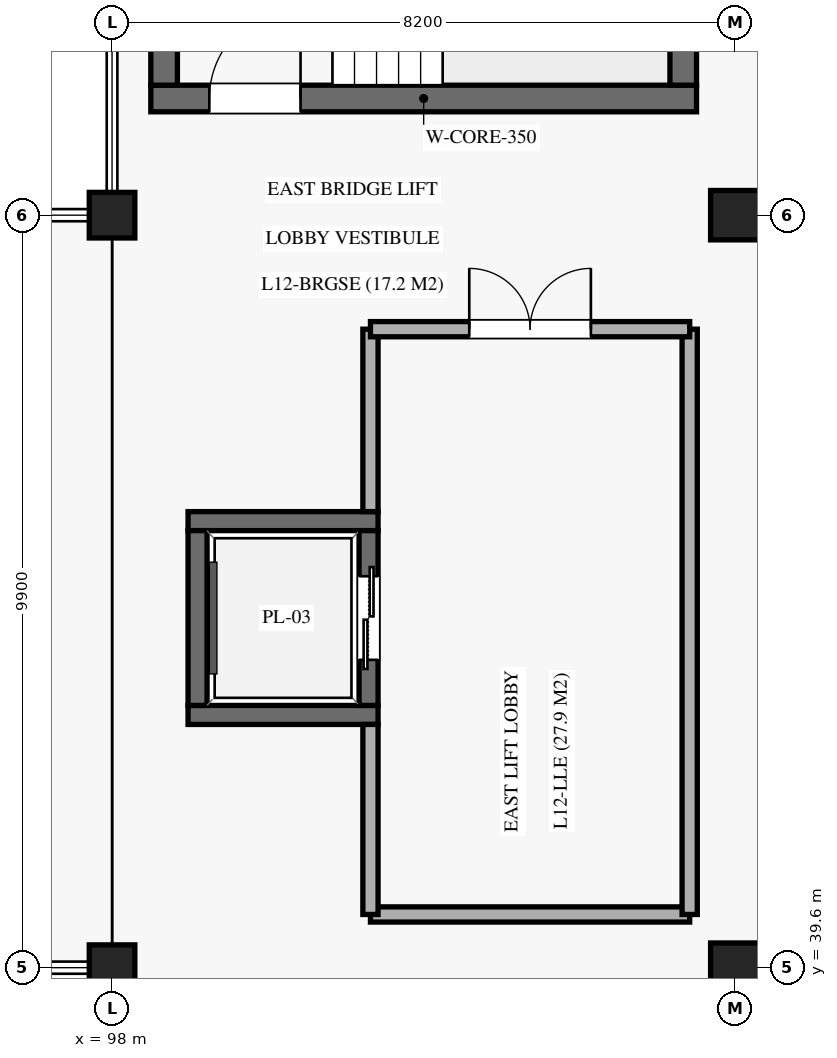
"""IFC4 building model, lengths in metres.
Left out: names, types, materials, properties, quantities, classifications, styles, units other than length and angle.
Written with IfcOpenShell. Run it as: python <this file> out.ifc"""

import sys

from ifc_helpers import new_model, si_unit, direction, frame, frame_2d, origin, origin_2d, place, context, subcontext, project, spatial, rectangle, extrude, element, fill, save


model = new_model("IFC4")
c1 = context("Model", 3, precision=1e-05, world=origin(), true_north=direction((0.0, 1.0)))
c2 = subcontext(c1, "Body", "Model", "MODEL_VIEW")
j1 = project(units=[si_unit("LENGTHUNIT", "METRE"), si_unit("PLANEANGLEUNIT", "RADIAN")], contexts=[c1])
p1 = place(None, origin())
s1 = spatial("IfcSite", under=j1, at=p1, CompositionType="ELEMENT")
p2 = place(p1, origin())
s2 = spatial("IfcBuilding", under=s1, at=p2, CompositionType="ELEMENT")
p3 = place(p2, frame((0.0, 0.0, 62.22)))
s3 = spatial("IfcBuildingStorey", under=s2, at=p3, CompositionType="ELEMENT", Elevation=62.22)
for number, where, z_axis, x_axis in (
    (1, (98.0, 39.6, 0.0), (0.0, 0.0, 1.0), (1.0, 0.0, 0.0)),
    (2, (98.0, 49.5, 0.0), (0.0, 0.0, 1.0), (1.0, 0.0, 0.0)),
):
    element("IfcColumn", number, at=place(p3, frame(where, z_axis=z_axis, x_axis=x_axis)), inside=s3, PredefinedType="COLUMN", context=c2, shape_type="SweptSolid", body=[
        extrude(rectangle(XDim=0.6, YDim=0.6, at=origin_2d()), origin(), (0.0, 0.0, 1.0), 4.08),
    ])
for number, where, z_axis, x_axis in (
    (3, (106.2, 39.6, 0.0), (0.0, 0.0, 1.0), (1.0, 0.0, 0.0)),
    (4, (106.2, 49.5, 0.0), (0.0, 0.0, 1.0), (1.0, 0.0, 0.0)),
):
    element("IfcColumn", number, at=place(p3, frame(where, z_axis=z_axis, x_axis=x_axis)), inside=s3, PredefinedType="COLUMN", context=c2, shape_type="SweptSolid", body=[
        extrude(rectangle(XDim=0.65, YDim=0.65, at=origin_2d()), origin(), (0.0, 0.0, 1.0), 4.08),
    ])
p4 = place(p3, frame((98.51, 51.035, 0.0), z_axis=(0.0, 0.0, 1.0), x_axis=(1.0, 0.0, 0.0)))
e5 = element("IfcWall", 5, at=p4, inside=s3, PredefinedType="SHEAR", context=c2, shape_type="SweptSolid", body=[
    extrude(rectangle(XDim=7.18, YDim=0.35, at=frame_2d((3.59, 0.0))), origin(), (0.0, 0.0, 1.0), 3.85),
])
p5 = place(p4, frame((0.77, 0.0, 0.0)))
e6 = element("IfcOpeningElement", 6, at=p5, cuts=e5, PredefinedType="OPENING", context=c2, shape_type="SweptSolid", body=[
    extrude(rectangle(XDim=1.2, YDim=2.2, at=frame_2d((0.6, 1.1))), frame((0.0, 0.185, 0.0), z_axis=(0.0, -1.0, 0.0), x_axis=(1.0, 0.0, 0.0)), (0.0, 0.0, 1.0), 0.37),
])
for number, where, z_axis, x_axis in (
    (7, (98.685, 51.21, 0.0), (0.0, 0.0, 1.0), (0.0, 1.0, 0.0)),
    (8, (105.515, 51.21, 0.0), (0.0, 0.0, 1.0), (0.0, 1.0, 0.0)),
):
    element("IfcWall", number, at=place(p3, frame(where, z_axis=z_axis, x_axis=x_axis)), inside=s3, PredefinedType="SHEAR", context=c2, shape_type="SweptSolid", body=[
        extrude(rectangle(XDim=6.48, YDim=0.35, at=frame_2d((3.24, 0.0))), origin(), (0.0, 0.0, 1.0), 3.85),
    ])
for number, where, z_axis, x_axis in (
    (9, (99.0, 42.925, 0.0), (0.0, 0.0, 1.0), (1.0, 0.0, 0.0)),
    (10, (99.0, 45.475, 0.0), (0.0, 0.0, 1.0), (1.0, 0.0, 0.0)),
):
    element("IfcWall", number, at=place(p3, frame(where, z_axis=z_axis, x_axis=x_axis)), inside=s3, PredefinedType="SOLIDWALL", context=c2, shape_type="SweptSolid", body=[
        extrude(rectangle(XDim=2.5, YDim=0.25, at=frame_2d((1.25, 0.0))), origin(), (0.0, 0.0, 1.0), 3.83),
    ])
p6 = place(p3, frame((99.125, 43.05, 0.0), z_axis=(0.0, 0.0, 1.0), x_axis=(0.0, 1.0, 0.0)))
e11 = element("IfcWall", 11, at=p6, inside=s3, PredefinedType="SOLIDWALL", context=c2, shape_type="SweptSolid", body=[
    extrude(rectangle(XDim=2.3, YDim=0.25, at=frame_2d((1.15, 0.0))), origin(), (0.0, 0.0, 1.0), 3.83),
])
p7 = place(p3, frame((101.375, 43.05, 0.0), z_axis=(0.0, 0.0, 1.0), x_axis=(0.0, 1.0, 0.0)))
e12 = element("IfcWall", 12, at=p7, inside=s3, PredefinedType="SOLIDWALL", context=c2, shape_type="SweptSolid", body=[
    extrude(rectangle(XDim=2.3, YDim=0.25, at=frame_2d((1.15, 0.0))), origin(), (0.0, 0.0, 1.0), 3.83),
])
p8 = place(p7, frame((0.6, 0.0, 0.0)))
e13 = element("IfcOpeningElement", 13, at=p8, cuts=e12, PredefinedType="OPENING", context=c2, shape_type="SweptSolid", body=[
    extrude(rectangle(XDim=1.1, YDim=2.2, at=frame_2d((0.55, 1.1))), frame((0.0, 0.135, 0.0), z_axis=(0.0, -1.0, 0.0), x_axis=(1.0, 0.0, 0.0)), (0.0, 0.0, 1.0), 0.27),
])
p9 = place(p3, frame((101.4, 40.3, 0.0), z_axis=(0.0, 0.0, 1.0), x_axis=(1.0, 0.0, 0.0)))
e14 = element("IfcWall", 14, at=p9, inside=s3, PredefinedType="SOLIDWALL", context=c2, shape_type="SweptSolid", body=[
    extrude(rectangle(XDim=4.2, YDim=0.2, at=frame_2d((2.1, 0.0))), origin(), (0.0, 0.0, 1.0), 2.97),
])
p10 = place(p3, frame((101.4, 40.3, 0.0), z_axis=(0.0, 0.0, 1.0), x_axis=(0.0, 1.0, 0.0)))
e15 = element("IfcWall", 15, at=p10, inside=s3, PredefinedType="SOLIDWALL", context=c2, shape_type="SweptSolid", body=[
    extrude(rectangle(XDim=2.5, YDim=0.2, at=frame_2d((1.25, 0.0))), origin(), (0.0, 0.0, 1.0), 2.97),
])
p11 = place(p3, frame((101.4, 45.6, 0.0), z_axis=(0.0, 0.0, 1.0), x_axis=(0.0, 1.0, 0.0)))
e16 = element("IfcWall", 16, at=p11, inside=s3, PredefinedType="SOLIDWALL", context=c2, shape_type="SweptSolid", body=[
    extrude(rectangle(XDim=2.4, YDim=0.2, at=frame_2d((1.2, 0.0))), origin(), (0.0, 0.0, 1.0), 2.97),
])
p12 = place(p3, frame((105.6, 40.3, 0.0), z_axis=(0.0, 0.0, 1.0), x_axis=(0.0, 1.0, 0.0)))
e17 = element("IfcWall", 17, at=p12, inside=s3, PredefinedType="SOLIDWALL", context=c2, shape_type="SweptSolid", body=[
    extrude(rectangle(XDim=7.7, YDim=0.2, at=frame_2d((3.85, 0.0))), origin(), (0.0, 0.0, 1.0), 2.97),
])
p13 = place(p3, frame((101.4, 48.0, 0.0), z_axis=(0.0, 0.0, 1.0), x_axis=(1.0, 0.0, 0.0)))
e18 = element("IfcWall", 18, at=p13, inside=s3, PredefinedType="SOLIDWALL", context=c2, shape_type="SweptSolid", body=[
    extrude(rectangle(XDim=4.2, YDim=0.2, at=frame_2d((2.1, 0.0))), origin(), (0.0, 0.0, 1.0), 2.97),
])
p14 = place(p13, frame((1.3, 0.0, 0.0)))
e19 = element("IfcOpeningElement", 19, at=p14, cuts=e18, PredefinedType="OPENING", context=c2, shape_type="SweptSolid", body=[
    extrude(rectangle(XDim=1.6, YDim=2.2, at=frame_2d((0.8, 1.1))), frame((0.0, 0.11, 0.0), z_axis=(0.0, -1.0, 0.0), x_axis=(1.0, 0.0, 0.0)), (0.0, 0.0, 1.0), 0.22),
])
p15 = place(p5, origin())
e20 = element("IfcDoor", 20, at=p15, inside=s3, OperationType="SINGLE_SWING_RIGHT", PredefinedType="DOOR", context=c2, shape_type="SweptSolid", body=[
    extrude(rectangle(XDim=1.2, YDim=2.2, at=frame_2d((0.6, 1.1))), frame((0.0, 0.025, 0.0), z_axis=(0.0, -1.0, 0.0), x_axis=(1.0, 0.0, 0.0)), (0.0, 0.0, 1.0), 0.05),
])
fill(e6, e20)
p16 = place(p8, origin())
e21 = element("IfcDoor", 21, at=p16, inside=s3, OperationType="DOUBLE_DOOR_SLIDING", PredefinedType="DOOR", context=c2, shape_type="SweptSolid", body=[
    extrude(rectangle(XDim=1.1, YDim=2.2, at=frame_2d((0.55, 1.1))), frame((0.0, 0.025, 0.0), z_axis=(0.0, -1.0, 0.0), x_axis=(1.0, 0.0, 0.0)), (0.0, 0.0, 1.0), 0.05),
])
fill(e13, e21)
p17 = place(p14, origin())
e22 = element("IfcDoor", 22, at=p17, inside=s3, OperationType="DOUBLE_DOOR_SINGLE_SWING", PredefinedType="DOOR", context=c2, shape_type="SweptSolid", body=[
    extrude(rectangle(XDim=1.6, YDim=2.2, at=frame_2d((0.8, 1.1))), frame((0.0, 0.025, 0.0), z_axis=(0.0, -1.0, 0.0), x_axis=(1.0, 0.0, 0.0)), (0.0, 0.0, 1.0), 0.05),
])
fill(e19, e22)
save(model, sys.argv[1])
